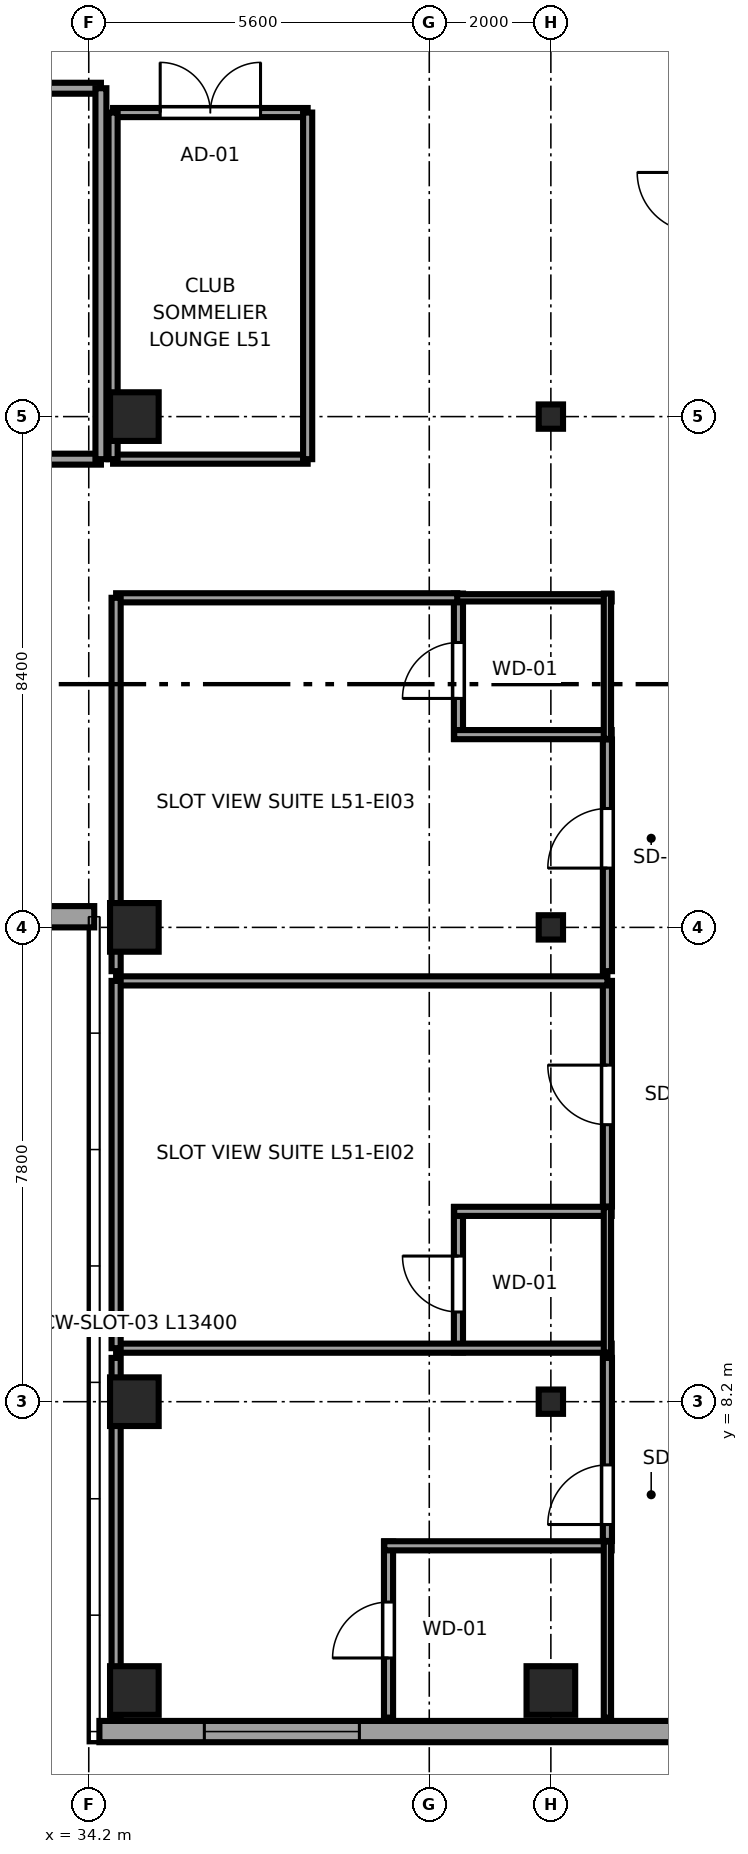
"""IFC4 building model, lengths in metres.
Left out: names, types, materials, properties, quantities, classifications, styles, units other than length and angle.
Written with IfcOpenShell. Run it as: python <this file> out.ifc"""

import sys

from ifc_helpers import new_model, si_unit, direction, frame, frame_2d, origin, origin_2d, place, context, subcontext, project, spatial, rectangle, i_section, extrude, source, transform, mapped, element, fill, save


model = new_model("IFC4")
c1 = context("Model", 3, precision=1e-05, world=origin(), true_north=direction((0.0, 1.0)))
c2 = subcontext(c1, "Body", "Model", "MODEL_VIEW")
j1 = project(units=[si_unit("LENGTHUNIT", "METRE"), si_unit("PLANEANGLEUNIT", "RADIAN")], contexts=[c1])
p1 = place(None, origin())
s1 = spatial("IfcSite", under=j1, at=p1, CompositionType="ELEMENT")
p2 = place(p1, origin())
s2 = spatial("IfcBuilding", under=s1, at=p2, CompositionType="ELEMENT")
p3 = place(p2, frame((0.0, 0.0, 194.65)))
s3 = spatial("IfcBuildingStorey", under=s2, at=p3, CompositionType="ELEMENT", Elevation=194.65)
m1 = source(origin(), c2, "Body", "SweptSolid", [
    extrude(rectangle(XDim=0.8, YDim=0.8, at=origin_2d()), origin(), (0.0, 0.0, 1.0), 3.55),
])
for number, where, z_axis, x_axis in (
    (1, (34.95, 3.45, 0.0), (0.0, 0.0, 1.0), (1.0, 0.0, 0.0)),
    (2, (34.95, 8.2, 0.0), (0.0, 0.0, 1.0), (1.0, 0.0, 0.0)),
    (3, (34.95, 16.0, 0.0), (0.0, 0.0, 1.0), (1.0, 0.0, 0.0)),
    (4, (34.95, 24.4, 0.0), (0.0, 0.0, 1.0), (1.0, 0.0, 0.0)),
    (5, (41.8, 3.45, 0.0), (0.0, 0.0, 1.0), (1.0, 0.0, 0.0)),
):
    element("IfcColumn", number, at=place(p3, frame(where, z_axis=z_axis, x_axis=x_axis)), inside=s3, PredefinedType="COLUMN", context=c2, shape_type="MappedRepresentation", body=[
        mapped(m1, transform((0.0, 0.0, 0.0), x_axis=(1.0, 0.0, 0.0), y_axis=(0.0, 1.0, 0.0), z_axis=(0.0, 0.0, 1.0), scale=1.0)),
    ])
m2 = source(origin(), c2, "Body", "SweptSolid", [
    extrude(i_section(OverallWidth=0.4, OverallDepth=0.4, WebThickness=0.02, FlangeThickness=0.035, at=origin_2d()), origin(), (0.0, 0.0, 1.0), 3.55),
])
for number, where, z_axis, x_axis in (
    (6, (41.8, 8.2, 0.0), (0.0, 0.0, 1.0), (1.0, 0.0, 0.0)),
    (7, (41.8, 16.0, 0.0), (0.0, 0.0, 1.0), (1.0, 0.0, 0.0)),
    (8, (41.8, 24.4, 0.0), (0.0, 0.0, 1.0), (1.0, 0.0, 0.0)),
):
    element("IfcColumn", number, at=place(p3, frame(where, z_axis=z_axis, x_axis=x_axis)), inside=s3, PredefinedType="COLUMN", context=c2, shape_type="MappedRepresentation", body=[
        mapped(m2, transform((0.0, 0.0, 0.0), x_axis=(1.0, 0.0, 0.0), y_axis=(0.0, 1.0, 0.0), z_axis=(0.0, 0.0, 1.0), scale=1.0)),
    ])
p4 = place(p3, frame((22.71, 16.175, 0.0), z_axis=(0.0, 0.0, 1.0), x_axis=(1.0, 0.0, 0.0)))
e9 = element("IfcWall", 9, at=p4, inside=s3, PredefinedType="SOLIDWALL", context=c2, shape_type="SweptSolid", body=[
    extrude(rectangle(XDim=11.58, YDim=0.35, at=frame_2d((5.79, 0.0))), origin(), (0.0, 0.0, 1.0), 2.758),
])
p5 = place(p4, frame((1.92, 0.0, 0.68)))
e10 = element("IfcOpeningElement", 10, at=p5, cuts=e9, PredefinedType="OPENING", context=c2, shape_type="SweptSolid", body=[
    extrude(rectangle(XDim=2.55, YDim=1.92, at=frame_2d((1.275, 0.96))), frame((0.0, 0.185, 0.0), z_axis=(0.0, -1.0, 0.0), x_axis=(1.0, 0.0, 0.0)), (0.0, 0.0, 1.0), 0.37),
])
p6 = place(p4, frame((7.11, 0.0, 0.68)))
e11 = element("IfcOpeningElement", 11, at=p6, cuts=e9, PredefinedType="OPENING", context=c2, shape_type="SweptSolid", body=[
    extrude(rectangle(XDim=2.55, YDim=1.92, at=frame_2d((1.275, 0.96))), frame((0.0, 0.185, 0.0), z_axis=(0.0, -1.0, 0.0), x_axis=(1.0, 0.0, 0.0)), (0.0, 0.0, 1.0), 0.37),
])
p7 = place(p3, frame((34.375, 2.775, 0.0), z_axis=(0.0, 0.0, 1.0), x_axis=(1.0, 0.0, 0.0)))
e12 = element("IfcWall", 12, at=p7, inside=s3, PredefinedType="SOLIDWALL", context=c2, shape_type="SweptSolid", body=[
    extrude(rectangle(XDim=15.608, YDim=0.35, at=frame_2d((7.804, 0.0))), origin(), (0.0, 0.0, 1.0), 3.37),
])
p8 = place(p7, frame((1.726, 0.0, 0.68)))
e13 = element("IfcOpeningElement", 13, at=p8, cuts=e12, PredefinedType="OPENING", context=c2, shape_type="SweptSolid", body=[
    extrude(rectangle(XDim=2.55, YDim=1.92, at=frame_2d((1.275, 0.96))), frame((0.0, 0.185, 0.0), z_axis=(0.0, -1.0, 0.0), x_axis=(1.0, 0.0, 0.0)), (0.0, 0.0, 1.0), 0.37),
])
p9 = place(p7, frame((11.331, 0.0, 0.68)))
e14 = element("IfcOpeningElement", 14, at=p9, cuts=e12, PredefinedType="OPENING", context=c2, shape_type="SweptSolid", body=[
    extrude(rectangle(XDim=2.55, YDim=1.92, at=frame_2d((1.275, 0.96))), frame((0.0, 0.185, 0.0), z_axis=(0.0, -1.0, 0.0), x_axis=(1.0, 0.0, 0.0)), (0.0, 0.0, 1.0), 0.37),
])
p10 = place(p3, frame((39.13, 3.005, 0.0), z_axis=(0.0, 0.0, 1.0), x_axis=(0.0, 1.0, 0.0)))
e15 = element("IfcWall", 15, at=p10, inside=s3, PredefinedType="PARTITIONING", context=c2, shape_type="SweptSolid", body=[
    extrude(rectangle(XDim=2.895, YDim=0.15, at=frame_2d((1.448, 0.0))), origin(), (0.0, 0.0, 1.0), 3.37),
])
p11 = place(p10, frame((0.98, 0.0, 0.0)))
e16 = element("IfcOpeningElement", 16, at=p11, cuts=e15, PredefinedType="OPENING", context=c2, shape_type="SweptSolid", body=[
    extrude(rectangle(XDim=0.92, YDim=2.01, at=frame_2d((0.46, 1.005))), frame((0.0, 0.085, 0.0), z_axis=(0.0, -1.0, 0.0), x_axis=(1.0, 0.0, 0.0)), (0.0, 0.0, 1.0), 0.17),
])
p12 = place(p3, frame((39.06, 5.83, 0.0), z_axis=(0.0, 0.0, 1.0), x_axis=(1.0, 0.0, 0.0)))
e17 = element("IfcWall", 17, at=p12, inside=s3, PredefinedType="PARTITIONING", context=c2, shape_type="SweptSolid", body=[
    extrude(rectangle(XDim=3.74, YDim=0.15, at=frame_2d((1.87, 0.0))), origin(), (0.0, 0.0, 1.0), 3.37),
])
p13 = place(p3, frame((42.73, 3.005, 0.0), z_axis=(0.0, 0.0, 1.0), x_axis=(0.0, 1.0, 0.0)))
e18 = element("IfcWall", 18, at=p13, inside=s3, PredefinedType="PLUMBINGWALL", context=c2, shape_type="SweptSolid", body=[
    extrude(rectangle(XDim=2.895, YDim=0.12, at=frame_2d((1.448, 0.0))), origin(), (0.0, 0.0, 1.0), 3.37),
])
p14 = place(p3, frame((40.28, 9.01, 0.0), z_axis=(0.0, 0.0, 1.0), x_axis=(0.0, 1.0, 0.0)))
e19 = element("IfcWall", 19, at=p14, inside=s3, PredefinedType="PARTITIONING", context=c2, shape_type="SweptSolid", body=[
    extrude(rectangle(XDim=2.39, YDim=0.15, at=frame_2d((1.195, 0.0))), origin(), (0.0, 0.0, 1.0), 3.37),
])
p15 = place(p14, frame((0.665, 0.0, 0.0)))
e20 = element("IfcOpeningElement", 20, at=p15, cuts=e19, PredefinedType="OPENING", context=c2, shape_type="SweptSolid", body=[
    extrude(rectangle(XDim=0.92, YDim=2.01, at=frame_2d((0.46, 1.005))), frame((0.0, 0.085, 0.0), z_axis=(0.0, -1.0, 0.0), x_axis=(1.0, 0.0, 0.0)), (0.0, 0.0, 1.0), 0.17),
])
p16 = place(p3, frame((34.65, 9.08, 0.0), z_axis=(0.0, 0.0, 1.0), x_axis=(1.0, 0.0, 0.0)))
e21 = element("IfcWall", 21, at=p16, inside=s3, PredefinedType="PARTITIONING", context=c2, shape_type="SweptSolid", body=[
    extrude(rectangle(XDim=8.15, YDim=0.15, at=frame_2d((4.075, 0.0))), origin(), (0.0, 0.0, 1.0), 3.37),
])
p17 = place(p3, frame((40.21, 11.33, 0.0), z_axis=(0.0, 0.0, 1.0), x_axis=(1.0, 0.0, 0.0)))
e22 = element("IfcWall", 22, at=p17, inside=s3, PredefinedType="PARTITIONING", context=c2, shape_type="SweptSolid", body=[
    extrude(rectangle(XDim=2.59, YDim=0.15, at=frame_2d((1.295, 0.0))), origin(), (0.0, 0.0, 1.0), 3.37),
])
p18 = place(p3, frame((42.73, 9.01, 0.0), z_axis=(0.0, 0.0, 1.0), x_axis=(0.0, 1.0, 0.0)))
e23 = element("IfcWall", 23, at=p18, inside=s3, PredefinedType="PLUMBINGWALL", context=c2, shape_type="SweptSolid", body=[
    extrude(rectangle(XDim=2.39, YDim=0.12, at=frame_2d((1.195, 0.0))), origin(), (0.0, 0.0, 1.0), 3.37),
])
p19 = place(p3, frame((40.28, 19.1, 0.0), z_axis=(0.0, 0.0, 1.0), x_axis=(0.0, 1.0, 0.0)))
e24 = element("IfcWall", 24, at=p19, inside=s3, PredefinedType="PARTITIONING", context=c2, shape_type="SweptSolid", body=[
    extrude(rectangle(XDim=2.39, YDim=0.15, at=frame_2d((1.195, 0.0))), origin(), (0.0, 0.0, 1.0), 3.37),
])
p20 = place(p19, frame((0.665, 0.0, 0.0)))
e25 = element("IfcOpeningElement", 25, at=p20, cuts=e24, PredefinedType="OPENING", context=c2, shape_type="SweptSolid", body=[
    extrude(rectangle(XDim=0.92, YDim=2.01, at=frame_2d((0.46, 1.005))), frame((0.0, 0.085, 0.0), z_axis=(0.0, -1.0, 0.0), x_axis=(1.0, 0.0, 0.0)), (0.0, 0.0, 1.0), 0.17),
])
p21 = place(p3, frame((40.21, 19.17, 0.0), z_axis=(0.0, 0.0, 1.0), x_axis=(1.0, 0.0, 0.0)))
e26 = element("IfcWall", 26, at=p21, inside=s3, PredefinedType="PARTITIONING", context=c2, shape_type="SweptSolid", body=[
    extrude(rectangle(XDim=2.59, YDim=0.15, at=frame_2d((1.295, 0.0))), origin(), (0.0, 0.0, 1.0), 3.37),
])
p22 = place(p3, frame((40.21, 21.42, 0.0), z_axis=(0.0, 0.0, 1.0), x_axis=(1.0, 0.0, 0.0)))
e27 = element("IfcWall", 27, at=p22, inside=s3, PredefinedType="PLUMBINGWALL", context=c2, shape_type="SweptSolid", body=[
    extrude(rectangle(XDim=2.59, YDim=0.12, at=frame_2d((1.295, 0.0))), origin(), (0.0, 0.0, 1.0), 3.37),
])
p23 = place(p3, frame((42.73, 19.1, 0.0), z_axis=(0.0, 0.0, 1.0), x_axis=(0.0, 1.0, 0.0)))
e28 = element("IfcWall", 28, at=p23, inside=s3, PredefinedType="PLUMBINGWALL", context=c2, shape_type="SweptSolid", body=[
    extrude(rectangle(XDim=2.39, YDim=0.12, at=frame_2d((1.195, 0.0))), origin(), (0.0, 0.0, 1.0), 3.37),
])
p24 = place(p3, frame((42.73, 5.91, 0.0), z_axis=(0.0, 0.0, 1.0), x_axis=(0.0, 1.0, 0.0)))
e29 = element("IfcWall", 29, at=p24, inside=s3, PredefinedType="PARTITIONING", context=c2, shape_type="SweptSolid", body=[
    extrude(rectangle(XDim=3.01, YDim=0.15, at=frame_2d((1.505, 0.0))), origin(), (0.0, 0.0, 1.0), 3.37),
])
p25 = place(p24, frame((0.27, 0.0, 0.0)))
e30 = element("IfcOpeningElement", 30, at=p25, cuts=e29, PredefinedType="OPENING", context=c2, shape_type="SweptSolid", body=[
    extrude(rectangle(XDim=0.98, YDim=2.12, at=frame_2d((0.49, 1.06))), frame((0.0, 0.085, 0.0), z_axis=(0.0, -1.0, 0.0), x_axis=(1.0, 0.0, 0.0)), (0.0, 0.0, 1.0), 0.17),
])
p26 = place(p3, frame((34.65, 3.005, 0.0), z_axis=(0.0, 0.0, 1.0), x_axis=(0.0, 1.0, 0.0)))
e31 = element("IfcWall", 31, at=p26, inside=s3, PredefinedType="PARTITIONING", context=c2, shape_type="SweptSolid", body=[
    extrude(rectangle(XDim=5.915, YDim=0.15, at=frame_2d((2.958, 0.0))), origin(), (0.0, 0.0, 1.0), 3.37),
])
p27 = place(p3, frame((42.73, 11.41, 0.0), z_axis=(0.0, 0.0, 1.0), x_axis=(0.0, 1.0, 0.0)))
e32 = element("IfcWall", 32, at=p27, inside=s3, PredefinedType="PARTITIONING", context=c2, shape_type="SweptSolid", body=[
    extrude(rectangle(XDim=3.71, YDim=0.15, at=frame_2d((1.855, 0.0))), origin(), (0.0, 0.0, 1.0), 3.37),
])
p28 = place(p27, frame((1.345, 0.0, 0.0)))
e33 = element("IfcOpeningElement", 33, at=p28, cuts=e32, PredefinedType="OPENING", context=c2, shape_type="SweptSolid", body=[
    extrude(rectangle(XDim=0.98, YDim=2.12, at=frame_2d((0.49, 1.06))), frame((0.0, 0.085, 0.0), z_axis=(0.0, -1.0, 0.0), x_axis=(1.0, 0.0, 0.0)), (0.0, 0.0, 1.0), 0.17),
])
p29 = place(p3, frame((34.65, 15.12, 0.0), z_axis=(0.0, 0.0, 1.0), x_axis=(1.0, 0.0, 0.0)))
e34 = element("IfcWall", 34, at=p29, inside=s3, PredefinedType="PARTITIONING", context=c2, shape_type="SweptSolid", body=[
    extrude(rectangle(XDim=8.08, YDim=0.15, at=frame_2d((4.04, 0.0))), origin(), (0.0, 0.0, 1.0), 3.37),
])
p30 = place(p3, frame((34.65, 9.08, 0.0), z_axis=(0.0, 0.0, 1.0), x_axis=(0.0, 1.0, 0.0)))
e35 = element("IfcWall", 35, at=p30, inside=s3, PredefinedType="PARTITIONING", context=c2, shape_type="SweptSolid", body=[
    extrude(rectangle(XDim=6.04, YDim=0.15, at=frame_2d((3.02, 0.0))), origin(), (0.0, 0.0, 1.0), 3.37),
])
p31 = place(p3, frame((42.73, 15.28, 0.0), z_axis=(0.0, 0.0, 1.0), x_axis=(0.0, 1.0, 0.0)))
e36 = element("IfcWall", 36, at=p31, inside=s3, PredefinedType="PARTITIONING", context=c2, shape_type="SweptSolid", body=[
    extrude(rectangle(XDim=3.81, YDim=0.15, at=frame_2d((1.905, 0.0))), origin(), (0.0, 0.0, 1.0), 3.37),
])
p32 = place(p31, frame((1.695, 0.0, 0.0)))
e37 = element("IfcOpeningElement", 37, at=p32, cuts=e36, PredefinedType="OPENING", context=c2, shape_type="SweptSolid", body=[
    extrude(rectangle(XDim=0.98, YDim=2.12, at=frame_2d((0.49, 1.06))), frame((0.0, 0.085, 0.0), z_axis=(0.0, -1.0, 0.0), x_axis=(1.0, 0.0, 0.0)), (0.0, 0.0, 1.0), 0.17),
])
p33 = place(p3, frame((34.65, 21.42, 0.0), z_axis=(0.0, 0.0, 1.0), x_axis=(1.0, 0.0, 0.0)))
e38 = element("IfcWall", 38, at=p33, inside=s3, PredefinedType="PARTITIONING", context=c2, shape_type="SweptSolid", body=[
    extrude(rectangle(XDim=5.61, YDim=0.15, at=frame_2d((2.805, 0.0))), origin(), (0.0, 0.0, 1.0), 3.37),
])
p34 = place(p3, frame((34.65, 15.28, 0.0), z_axis=(0.0, 0.0, 1.0), x_axis=(0.0, 1.0, 0.0)))
e39 = element("IfcWall", 39, at=p34, inside=s3, PredefinedType="PARTITIONING", context=c2, shape_type="SweptSolid", body=[
    extrude(rectangle(XDim=6.14, YDim=0.15, at=frame_2d((3.07, 0.0))), origin(), (0.0, 0.0, 1.0), 3.37),
])
p35 = place(p3, frame((27.1, 23.7, 0.0), z_axis=(0.0, 0.0, 1.0), x_axis=(1.0, 0.0, 0.0)))
e40 = element("IfcWall", 40, at=p35, inside=s3, PredefinedType="PARTITIONING", context=c2, shape_type="SweptSolid", body=[
    extrude(rectangle(XDim=7.3, YDim=0.18, at=frame_2d((3.65, 0.0))), origin(), (0.0, 0.0, 1.0), 3.37),
])
p36 = place(p35, frame((2.825, 0.0, 0.0)))
e41 = element("IfcOpeningElement", 41, at=p36, cuts=e40, PredefinedType="OPENING", context=c2, shape_type="SweptSolid", body=[
    extrude(rectangle(XDim=1.65, YDim=2.15, at=frame_2d((0.825, 1.075))), frame((0.0, 0.1, 0.0), z_axis=(0.0, -1.0, 0.0), x_axis=(1.0, 0.0, 0.0)), (0.0, 0.0, 1.0), 0.2),
])
p37 = place(p3, frame((27.1, 29.8, 0.0), z_axis=(0.0, 0.0, 1.0), x_axis=(1.0, 0.0, 0.0)))
e42 = element("IfcWall", 42, at=p37, inside=s3, PredefinedType="PARTITIONING", context=c2, shape_type="SweptSolid", body=[
    extrude(rectangle(XDim=7.3, YDim=0.18, at=frame_2d((3.65, 0.0))), origin(), (0.0, 0.0, 1.0), 3.37),
])
p38 = place(p3, frame((34.4, 23.7, 0.0), z_axis=(0.0, 0.0, 1.0), x_axis=(0.0, 1.0, 0.0)))
e43 = element("IfcWall", 43, at=p38, inside=s3, PredefinedType="PARTITIONING", context=c2, shape_type="SweptSolid", body=[
    extrude(rectangle(XDim=6.1, YDim=0.18, at=frame_2d((3.05, 0.0))), origin(), (0.0, 0.0, 1.0), 3.37),
])
p39 = place(p3, frame((34.6, 23.7, 0.0), z_axis=(0.0, 0.0, 1.0), x_axis=(1.0, 0.0, 0.0)))
e44 = element("IfcWall", 44, at=p39, inside=s3, PredefinedType="PARTITIONING", context=c2, shape_type="SweptSolid", body=[
    extrude(rectangle(XDim=3.2, YDim=0.15, at=frame_2d((1.6, 0.0))), origin(), (0.0, 0.0, 1.0), 3.37),
])
p40 = place(p3, frame((34.6, 29.4, 0.0), z_axis=(0.0, 0.0, 1.0), x_axis=(1.0, 0.0, 0.0)))
e45 = element("IfcWall", 45, at=p40, inside=s3, PredefinedType="PARTITIONING", context=c2, shape_type="SweptSolid", body=[
    extrude(rectangle(XDim=3.2, YDim=0.15, at=frame_2d((1.6, 0.0))), origin(), (0.0, 0.0, 1.0), 3.37),
])
p41 = place(p40, frame((0.775, 0.0, 0.0)))
e46 = element("IfcOpeningElement", 46, at=p41, cuts=e45, PredefinedType="OPENING", context=c2, shape_type="SweptSolid", body=[
    extrude(rectangle(XDim=1.65, YDim=2.15, at=frame_2d((0.825, 1.075))), frame((0.0, 0.085, 0.0), z_axis=(0.0, -1.0, 0.0), x_axis=(1.0, 0.0, 0.0)), (0.0, 0.0, 1.0), 0.17),
])
for number, where, z_axis, x_axis in (
    (47, (34.6, 23.7, 0.0), (0.0, 0.0, 1.0), (0.0, 1.0, 0.0)),
    (48, (37.8, 23.7, 0.0), (0.0, 0.0, 1.0), (0.0, 1.0, 0.0)),
):
    element("IfcWall", number, at=place(p3, frame(where, z_axis=z_axis, x_axis=x_axis)), inside=s3, PredefinedType="PARTITIONING", context=c2, shape_type="SweptSolid", body=[
        extrude(rectangle(XDim=5.7, YDim=0.15, at=frame_2d((2.85, 0.0))), origin(), (0.0, 0.0, 1.0), 3.37),
    ])
m3 = source(origin(), c2, "Body", "SweptSolid", [
    extrude(rectangle(XDim=2.55, YDim=1.92, at=frame_2d((1.275, 0.96))), frame((0.0, 0.09, 0.0), z_axis=(0.0, -1.0, 0.0), x_axis=(1.0, 0.0, 0.0)), (0.0, 0.0, 1.0), 0.06),
])
p42 = place(p8, origin())
e49 = element("IfcWindow", 49, at=p42, inside=s3, PartitioningType="TRIPLE_PANEL_HORIZONTAL", PredefinedType="WINDOW", context=c2, shape_type="MappedRepresentation", body=[
    mapped(m3, transform((0.0, 0.0, 0.0), x_axis=(1.0, 0.0, 0.0), y_axis=(0.0, 1.0, 0.0), z_axis=(0.0, 0.0, 1.0), scale=1.0)),
])
fill(e13, e49)
m4 = source(origin(), c2, "Body", "SweptSolid", [
    extrude(rectangle(XDim=0.92, YDim=2.01, at=frame_2d((0.46, 1.005))), frame((0.0, 0.025, 0.0), z_axis=(0.0, -1.0, 0.0), x_axis=(1.0, 0.0, 0.0)), (0.0, 0.0, 1.0), 0.05),
])
p43 = place(p11, origin())
e50 = element("IfcDoor", 50, at=p43, inside=s3, OperationType="SINGLE_SWING_LEFT", PredefinedType="DOOR", context=c2, shape_type="MappedRepresentation", body=[
    mapped(m4, transform((0.0, 0.0, 0.0), x_axis=(1.0, 0.0, 0.0), y_axis=(0.0, 1.0, 0.0), z_axis=(0.0, 0.0, 1.0), scale=1.0)),
])
fill(e16, e50)
p44 = place(p15, origin())
e51 = element("IfcDoor", 51, at=p44, inside=s3, OperationType="SINGLE_SWING_RIGHT", PredefinedType="DOOR", context=c2, shape_type="MappedRepresentation", body=[
    mapped(m4, transform((0.0, 0.0, 0.0), x_axis=(1.0, 0.0, 0.0), y_axis=(0.0, 1.0, 0.0), z_axis=(0.0, 0.0, 1.0), scale=1.0)),
])
fill(e20, e51)
p45 = place(p20, origin())
e52 = element("IfcDoor", 52, at=p45, inside=s3, OperationType="SINGLE_SWING_LEFT", PredefinedType="DOOR", context=c2, shape_type="MappedRepresentation", body=[
    mapped(m4, transform((0.0, 0.0, 0.0), x_axis=(1.0, 0.0, 0.0), y_axis=(0.0, 1.0, 0.0), z_axis=(0.0, 0.0, 1.0), scale=1.0)),
])
fill(e25, e52)
m5 = source(origin(), c2, "Body", "SweptSolid", [
    extrude(rectangle(XDim=0.98, YDim=2.12, at=frame_2d((0.49, 1.06))), frame((0.0, 0.025, 0.0), z_axis=(0.0, -1.0, 0.0), x_axis=(1.0, 0.0, 0.0)), (0.0, 0.0, 1.0), 0.05),
])
p46 = place(p25, origin())
e53 = element("IfcDoor", 53, at=p46, inside=s3, OperationType="SINGLE_SWING_LEFT", PredefinedType="DOOR", context=c2, shape_type="MappedRepresentation", body=[
    mapped(m5, transform((0.0, 0.0, 0.0), x_axis=(1.0, 0.0, 0.0), y_axis=(0.0, 1.0, 0.0), z_axis=(0.0, 0.0, 1.0), scale=1.0)),
])
fill(e30, e53)
p47 = place(p28, origin())
e54 = element("IfcDoor", 54, at=p47, inside=s3, OperationType="SINGLE_SWING_RIGHT", PredefinedType="DOOR", context=c2, shape_type="MappedRepresentation", body=[
    mapped(m5, transform((0.0, 0.0, 0.0), x_axis=(1.0, 0.0, 0.0), y_axis=(0.0, 1.0, 0.0), z_axis=(0.0, 0.0, 1.0), scale=1.0)),
])
fill(e33, e54)
p48 = place(p32, origin())
e55 = element("IfcDoor", 55, at=p48, inside=s3, OperationType="SINGLE_SWING_LEFT", PredefinedType="DOOR", context=c2, shape_type="MappedRepresentation", body=[
    mapped(m5, transform((0.0, 0.0, 0.0), x_axis=(1.0, 0.0, 0.0), y_axis=(0.0, 1.0, 0.0), z_axis=(0.0, 0.0, 1.0), scale=1.0)),
])
fill(e37, e55)
m6 = source(origin(), c2, "Body", "SweptSolid", [
    extrude(rectangle(XDim=1.65, YDim=2.15, at=frame_2d((0.825, 1.075))), frame((0.0, 0.025, 0.0), z_axis=(0.0, -1.0, 0.0), x_axis=(1.0, 0.0, 0.0)), (0.0, 0.0, 1.0), 0.05),
])
p49 = place(p41, origin())
e56 = element("IfcDoor", 56, at=p49, inside=s3, OperationType="DOUBLE_DOOR_SINGLE_SWING", PredefinedType="DOOR", context=c2, shape_type="MappedRepresentation", body=[
    mapped(m6, transform((0.0, 0.0, 0.0), x_axis=(1.0, 0.0, 0.0), y_axis=(0.0, 1.0, 0.0), z_axis=(0.0, 0.0, 1.0), scale=1.0)),
])
fill(e46, e56)
save(model, sys.argv[1])
